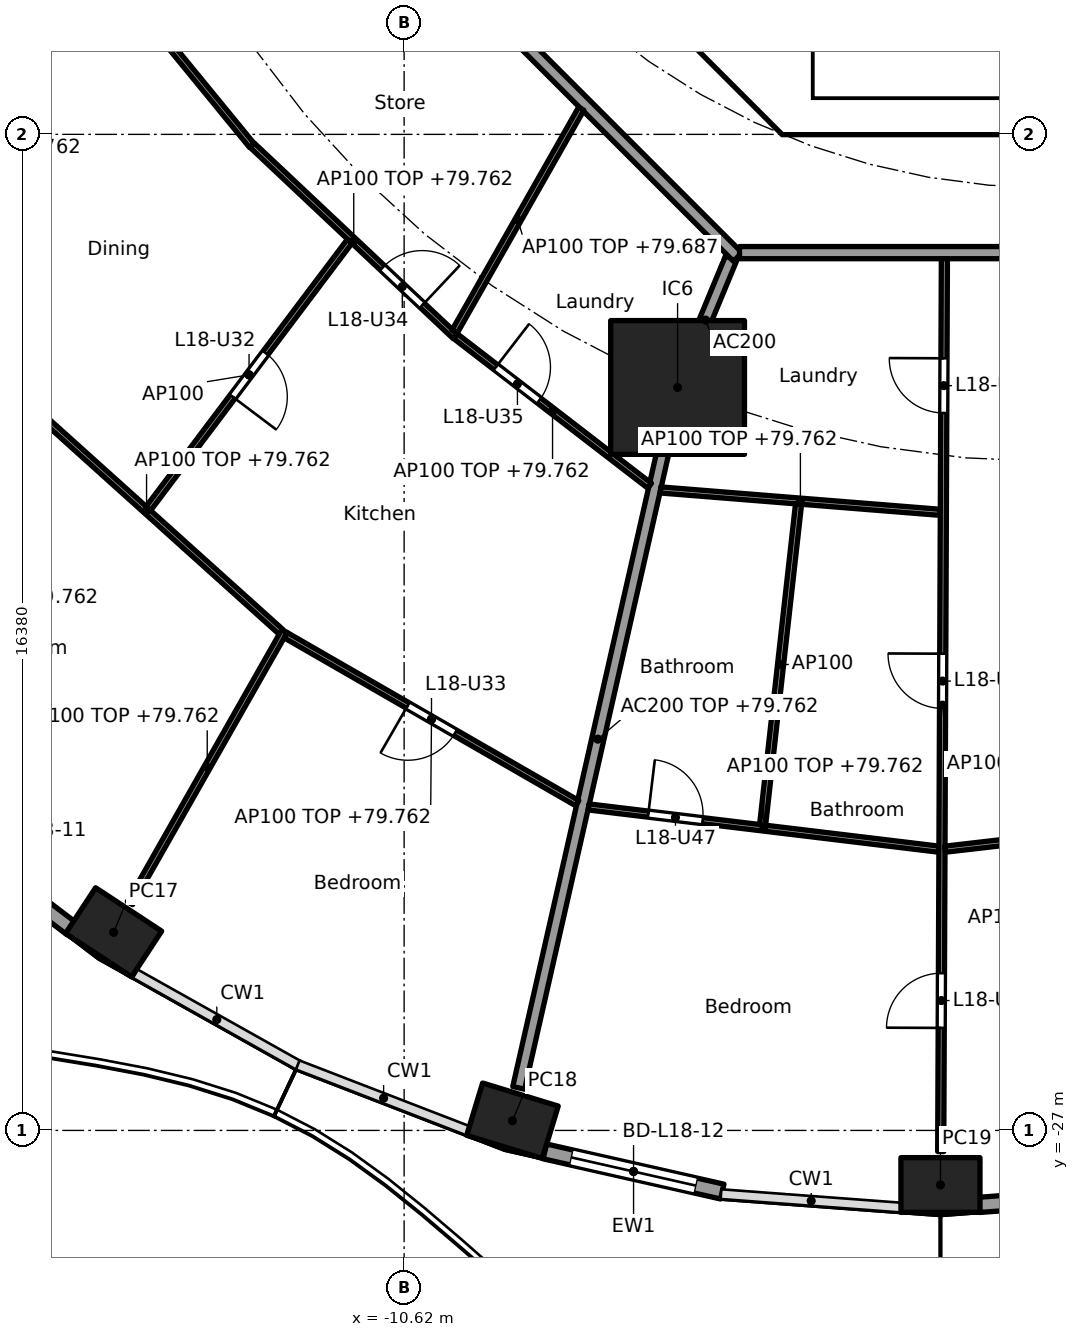
"""IFC4 building model, lengths in metres.
Left out: names, types, materials, properties, quantities, classifications, styles, units other than length and angle.
Written with IfcOpenShell. Run it as: python <this file> out.ifc"""

import sys

from ifc_helpers import new_model, si_unit, direction, frame, frame_2d, origin, origin_2d, place, context, subcontext, project, spatial, polyline, rectangle, hollow_rectangle, outline, extrude, element, fill, save


model = new_model("IFC4")
c1 = context("Model", 3, precision=1e-05, world=origin(), true_north=direction((0.0, 1.0)))
c2 = subcontext(c1, "Body", "Model", "MODEL_VIEW")
j1 = project(units=[si_unit("LENGTHUNIT", "METRE"), si_unit("PLANEANGLEUNIT", "RADIAN")], contexts=[c1])
p1 = place(None, origin())
s1 = spatial("IfcSite", under=j1, at=p1, CompositionType="ELEMENT")
p2 = place(p1, origin())
s2 = spatial("IfcBuilding", under=s1, at=p2, CompositionType="ELEMENT")
p3 = place(p2, frame((0.0, 0.0, 77.0)))
s3 = spatial("IfcBuildingStorey", under=s2, at=p3, CompositionType="ELEMENT", Elevation=77.0)
for number, where, z_axis, x_axis in (
    (1, (-15.397, -23.742, 0.0), (0.0, 0.0, 1.0), (0.836, -0.549, 0.0)),
    (2, (-8.839, -26.841, 0.0), (0.0, 0.0, 1.0), (0.957, -0.292, 0.0)),
    (3, (-1.8, -27.897, 0.0), (0.0, 0.0, 1.0), (1.0, 0.0, 0.0)),
):
    element("IfcColumn", number, at=place(p3, frame(where, z_axis=z_axis, x_axis=x_axis)), inside=s3, PredefinedType="COLUMN", context=c2, shape_type="SweptSolid", body=[
        extrude(hollow_rectangle(XDim=1.3, YDim=0.9, WallThickness=0.045, at=origin_2d()), origin(), (0.0, 0.0, 1.0), 3.7),
    ])
p4 = place(p3, frame((-6.123, -14.782, 0.0), z_axis=(0.0, 0.0, 1.0), x_axis=(1.0, 0.0, 0.0)))
e4 = element("IfcColumn", 4, at=p4, inside=s3, PredefinedType="COLUMN", context=c2, shape_type="SweptSolid", body=[
    extrude(rectangle(XDim=2.2, YDim=2.2, at=origin_2d()), origin(), (0.0, 0.0, 1.0), 3.7),
])
p5 = place(p3, frame((-16.089, -23.682, 0.0), z_axis=(0.0, 0.0, 1.0), x_axis=(-0.796037575978, 0.605247203736, 0.0)))
e5 = element("IfcWall", 5, at=p5, inside=s3, PredefinedType="SOLIDWALL", context=c2, shape_type="SweptSolid", body=[
    extrude(rectangle(XDim=3.134, YDim=0.25, at=frame_2d((1.567, 0.0))), origin(), (0.0, 0.0, 1.0), 3.44),
])
p6 = place(p5, frame((0.517, 0.0, 0.0)))
e6 = element("IfcOpeningElement", 6, at=p6, cuts=e5, PredefinedType="OPENING", context=c2, shape_type="SweptSolid", body=[
    extrude(rectangle(XDim=2.1, YDim=2.4, at=frame_2d((1.05, 1.2))), frame((0.0, 0.135, 0.0), z_axis=(0.0, -1.0, 0.0), x_axis=(1.0, 0.0, 0.0)), (0.0, 0.0, 1.0), 0.27),
])
p7 = place(p3, frame((-5.387, -28.006, 0.0), z_axis=(0.0, 0.0, 1.0), x_axis=(-0.975317607872, 0.220806620767, 0.0)))
e7 = element("IfcWall", 7, at=p7, inside=s3, PredefinedType="SOLIDWALL", context=c2, shape_type="SweptSolid", body=[
    extrude(rectangle(XDim=2.993, YDim=0.25, at=frame_2d((1.497, 0.0))), origin(), (0.0, 0.0, 1.0), 3.44),
])
p8 = place(p7, frame((0.447, 0.0, 0.0)))
e8 = element("IfcOpeningElement", 8, at=p8, cuts=e7, PredefinedType="OPENING", context=c2, shape_type="SweptSolid", body=[
    extrude(rectangle(XDim=2.1, YDim=2.4, at=frame_2d((1.05, 1.2))), frame((0.0, 0.135, 0.0), z_axis=(0.0, -1.0, 0.0), x_axis=(1.0, 0.0, 0.0)), (0.0, 0.0, 1.0), 0.27),
])
p9 = place(p3, frame((1.806, -28.003, 0.0), z_axis=(0.0, 0.0, 1.0), x_axis=(-0.997226174467, -0.074430887117, 0.0)))
e9 = element("IfcWall", 9, at=p9, inside=s3, PredefinedType="SOLIDWALL", context=c2, shape_type="SweptSolid", body=[
    extrude(rectangle(XDim=2.975, YDim=0.25, at=frame_2d((1.488, 0.0))), origin(), (0.0, 0.0, 1.0), 3.44),
])
p10 = place(p9, frame((0.438, 0.0, 0.0)))
e10 = element("IfcOpeningElement", 10, at=p10, cuts=e9, PredefinedType="OPENING", context=c2, shape_type="SweptSolid", body=[
    extrude(rectangle(XDim=2.1, YDim=2.4, at=frame_2d((1.05, 1.2))), frame((0.0, 0.135, 0.0), z_axis=(0.0, -1.0, 0.0), x_axis=(1.0, 0.0, 0.0)), (0.0, 0.0, 1.0), 0.27),
])
p11 = place(p3, frame((-9.988, -4.613, 0.0), z_axis=(0.0, 0.0, 1.0), x_axis=(0.707106781187, -0.707106781187, 0.0)))
e11 = element("IfcWall", 11, at=p11, inside=s3, PredefinedType="SHEAR", context=c2, shape_type="SweptSolid", body=[
    extrude(rectangle(XDim=7.602, YDim=0.6, at=frame_2d((3.801, 0.0))), origin(), (0.0, 0.0, 1.0), 3.44),
])
p12 = place(p11, frame((6.151, 0.0, 0.0)))
e12 = element("IfcOpeningElement", 12, at=p12, cuts=e11, PredefinedType="OPENING", context=c2, shape_type="SweptSolid", body=[
    extrude(rectangle(XDim=1.1, YDim=2.1, at=frame_2d((0.55, 1.05))), frame((0.0, 0.31, 0.0), z_axis=(0.0, -1.0, 0.0), x_axis=(1.0, 0.0, 0.0)), (0.0, 0.0, 1.0), 0.62),
])
p13 = place(p3, origin())
e13 = element("IfcWall", 13, at=p13, inside=s3, PredefinedType="SHEAR", context=c2, shape_type="SweptSolid", body=[
    extrude(outline(polyline([(-4.152, -10.025), (4.152, -10.025), (4.401, -9.776), (4.825, -10.2), (4.401, -10.625), (-4.401, -10.625), (-4.825, -10.2), (-4.401, -9.776), (-4.152, -10.025)])), origin(), (0.0, 0.0, 1.0), 3.44),
])
p14 = place(p3, origin())
e14 = element("IfcWall", 14, at=p14, inside=s3, PredefinedType="SOLIDWALL", context=c2, shape_type="SweptSolid", body=[
    extrude(outline(polyline([(-3.9, -10.025), (-4.1, -10.025), (-4.1, -7.025), (-3.9, -7.025), (-3.9, -10.025)])), origin(), (0.0, 0.0, 1.0), 3.44),
])
p15 = place(p3, frame((-5.243, -12.657, 0.0), z_axis=(0.0, 0.0, 1.0), x_axis=(-0.382668627144, -0.923885664896, 0.0)))
e15 = element("IfcWall", 15, at=p15, inside=s3, PredefinedType="PARTITIONING", context=c2, shape_type="SweptSolid", body=[
    extrude(rectangle(XDim=2.2, YDim=0.2, at=frame_2d((1.1, 0.0))), origin(), (0.0, 0.0, 1.0), 3.44),
])
p16 = place(p3, frame((-6.134, -14.831, 0.0), z_axis=(0.0, 0.0, 1.0), x_axis=(-0.221225405869, -0.975222702667, 0.0)))
e16 = element("IfcWall", 16, at=p16, inside=s3, PredefinedType="PARTITIONING", context=c2, shape_type="SweptSolid", body=[
    extrude(rectangle(XDim=11.761, YDim=0.2, at=frame_2d((5.88, 0.0))), origin(), (0.0, 0.0, 1.0), 2.762),
])
p17 = place(p3, frame((-12.635, -5.134, 0.0), z_axis=(0.0, 0.0, 1.0), x_axis=(0.707106781187, -0.707106781187, 0.0)))
e17 = element("IfcWall", 17, at=p17, inside=s3, PredefinedType="PARTITIONING", context=c2, shape_type="SweptSolid", body=[
    extrude(rectangle(XDim=10.609, YDim=0.2, at=frame_2d((5.305, 0.0))), origin(), (0.0, 0.0, 1.0), 3.44),
])
p18 = place(p3, frame((-5.104, -12.565, 0.0), z_axis=(0.0, 0.0, 1.0), x_axis=(1.0, 0.0, 0.0)))
e18 = element("IfcWall", 18, at=p18, inside=s3, PredefinedType="PARTITIONING", context=c2, shape_type="SweptSolid", body=[
    extrude(rectangle(XDim=10.409, YDim=0.2, at=frame_2d((5.205, 0.0))), origin(), (0.0, 0.0, 1.0), 3.44),
])
p19 = place(p18, frame((4.604, 0.0, 0.0)))
e19 = element("IfcOpeningElement", 19, at=p19, cuts=e18, PredefinedType="OPENING", context=c2, shape_type="SweptSolid", body=[
    extrude(rectangle(XDim=1.0, YDim=2.1, at=frame_2d((0.5, 1.05))), frame((0.0, 0.11, 0.0), z_axis=(0.0, -1.0, 0.0), x_axis=(1.0, 0.0, 0.0)), (0.0, 0.0, 1.0), 0.22),
])
p20 = place(p3, frame((-16.277, -6.951, 0.0), z_axis=(0.0, 0.0, 1.0), x_axis=(0.633427340372, -0.773802173988, 0.0)))
e20 = element("IfcWall", 20, at=p20, inside=s3, PredefinedType="PARTITIONING", context=c2, shape_type="SweptSolid", body=[
    extrude(rectangle(XDim=4.979, YDim=0.1, at=frame_2d((2.49, 0.0))), origin(), (0.0, 0.0, 1.0), 2.762),
])
p21 = place(p3, frame((-13.118, -10.8, 0.0), z_axis=(0.0, 0.0, 1.0), x_axis=(0.72818280142, -0.685382964273, 0.0)))
e21 = element("IfcWall", 21, at=p21, inside=s3, PredefinedType="PARTITIONING", context=c2, shape_type="SweptSolid", body=[
    extrude(rectangle(XDim=4.586, YDim=0.1, at=frame_2d((2.293, 0.0))), origin(), (0.0, 0.0, 1.0), 2.762),
])
p22 = place(p21, frame((2.94, 0.0, 0.0)))
e22 = element("IfcOpeningElement", 22, at=p22, cuts=e21, PredefinedType="OPENING", context=c2, shape_type="SweptSolid", body=[
    extrude(rectangle(XDim=0.9, YDim=2.1, at=frame_2d((0.45, 1.05))), frame((0.0, 0.06, 0.0), z_axis=(0.0, -1.0, 0.0), x_axis=(1.0, 0.0, 0.0)), (0.0, 0.0, 1.0), 0.12),
])
p23 = place(p3, frame((-17.063, -14.827, 0.0), z_axis=(0.0, 0.0, 1.0), x_axis=(0.743478142868, -0.668760234373, 0.0)))
e23 = element("IfcWall", 23, at=p23, inside=s3, PredefinedType="PARTITIONING", context=c2, shape_type="SweptSolid", body=[
    extrude(rectangle(XDim=5.937, YDim=0.1, at=frame_2d((2.969, 0.0))), origin(), (0.0, 0.0, 1.0), 2.762),
])
p24 = place(p3, frame((-11.515, -12.377, 0.0), z_axis=(0.0, 0.0, 1.0), x_axis=(-0.60163860397, -0.798768420891, 0.0)))
e24 = element("IfcWall", 24, at=p24, inside=s3, PredefinedType="PARTITIONING", context=c2, shape_type="SweptSolid", body=[
    extrude(rectangle(XDim=5.502, YDim=0.1, at=frame_2d((2.751, 0.0))), origin(), (0.0, 0.0, 1.0), 3.44),
])
p25 = place(p24, frame((2.301, 0.0, 0.0)))
e25 = element("IfcOpeningElement", 25, at=p25, cuts=e24, PredefinedType="OPENING", context=c2, shape_type="SweptSolid", body=[
    extrude(rectangle(XDim=0.9, YDim=2.1, at=frame_2d((0.45, 1.05))), frame((0.0, 0.06, 0.0), z_axis=(0.0, -1.0, 0.0), x_axis=(1.0, 0.0, 0.0)), (0.0, 0.0, 1.0), 0.12),
])
p26 = place(p3, frame((-7.707, -10.198, 0.0), z_axis=(0.0, 0.0, 1.0), x_axis=(-0.493986531217, -0.869469554945, 0.0)))
e26 = element("IfcWall", 26, at=p26, inside=s3, PredefinedType="PARTITIONING", context=c2, shape_type="SweptSolid", body=[
    extrude(rectangle(XDim=4.217, YDim=0.1, at=frame_2d((2.109, 0.0))), origin(), (0.0, 0.0, 1.0), 2.687),
])
p27 = place(p3, frame((-9.775, -13.939, 0.0), z_axis=(0.0, 0.0, 1.0), x_axis=(0.792162117554, -0.610310723741, 0.0)))
e27 = element("IfcWall", 27, at=p27, inside=s3, PredefinedType="PARTITIONING", context=c2, shape_type="SweptSolid", body=[
    extrude(rectangle(XDim=4.03, YDim=0.1, at=frame_2d((2.015, 0.0))), origin(), (0.0, 0.0, 1.0), 2.762),
])
p28 = place(p27, frame((0.836, 0.0, 0.0)))
e28 = element("IfcOpeningElement", 28, at=p28, cuts=e27, PredefinedType="OPENING", context=c2, shape_type="SweptSolid", body=[
    extrude(rectangle(XDim=0.9, YDim=2.1, at=frame_2d((0.45, 1.05))), frame((0.0, 0.06, 0.0), z_axis=(0.0, -1.0, 0.0), x_axis=(1.0, 0.0, 0.0)), (0.0, 0.0, 1.0), 0.12),
])
p29 = place(p3, frame((-12.587, -18.787, 0.0), z_axis=(0.0, 0.0, 1.0), x_axis=(-0.493966211317, -0.869481099321, 0.0)))
e29 = element("IfcWall", 29, at=p29, inside=s3, PredefinedType="PARTITIONING", context=c2, shape_type="SweptSolid", body=[
    extrude(rectangle(XDim=5.146, YDim=0.1, at=frame_2d((2.573, 0.0))), origin(), (0.0, 0.0, 1.0), 2.762),
])
p30 = place(p3, frame((-12.568, -18.856, 0.0), z_axis=(0.0, 0.0, 1.0), x_axis=(0.866533437451, -0.499119025664, 0.0)))
e30 = element("IfcWall", 30, at=p30, inside=s3, PredefinedType="PARTITIONING", context=c2, shape_type="SweptSolid", body=[
    extrude(rectangle(XDim=5.535, YDim=0.1, at=frame_2d((2.768, 0.0))), origin(), (0.0, 0.0, 1.0), 2.762),
])
p31 = place(p30, frame((2.317, 0.0, 0.0)))
e31 = element("IfcOpeningElement", 31, at=p31, cuts=e30, PredefinedType="OPENING", context=c2, shape_type="SweptSolid", body=[
    extrude(rectangle(XDim=0.9, YDim=2.1, at=frame_2d((0.45, 1.05))), frame((0.0, 0.06, 0.0), z_axis=(0.0, -1.0, 0.0), x_axis=(1.0, 0.0, 0.0)), (0.0, 0.0, 1.0), 0.12),
])
p32 = place(p3, frame((-6.404, -16.468, 0.0), z_axis=(0.0, 0.0, 1.0), x_axis=(0.996818808981, -0.079701079432, 0.0)))
e32 = element("IfcWall", 32, at=p32, inside=s3, PredefinedType="PARTITIONING", context=c2, shape_type="SweptSolid", body=[
    extrude(rectangle(XDim=4.616, YDim=0.1, at=frame_2d((2.308, 0.0))), origin(), (0.0, 0.0, 1.0), 2.762),
])
p33 = place(p3, frame((-7.586, -21.68, 0.0), z_axis=(0.0, 0.0, 1.0), x_axis=(0.992810189026, -0.119699325668, 0.0)))
e33 = element("IfcWall", 33, at=p33, inside=s3, PredefinedType="PARTITIONING", context=c2, shape_type="SweptSolid", body=[
    extrude(rectangle(XDim=5.803, YDim=0.1, at=frame_2d((2.901, 0.0))), origin(), (0.0, 0.0, 1.0), 2.762),
])
p34 = place(p33, frame((0.988, 0.0, 0.0)))
e34 = element("IfcOpeningElement", 34, at=p34, cuts=e33, PredefinedType="OPENING", context=c2, shape_type="SweptSolid", body=[
    extrude(rectangle(XDim=0.9, YDim=2.1, at=frame_2d((0.45, 1.05))), frame((0.0, 0.06, 0.0), z_axis=(0.0, -1.0, 0.0), x_axis=(1.0, 0.0, 0.0)), (0.0, 0.0, 1.0), 0.12),
])
p35 = place(p3, frame((-4.134, -16.699, 0.0), z_axis=(0.0, 0.0, 1.0), x_axis=(-0.111340048649, -0.993782367305, 0.0)))
e35 = element("IfcWall", 35, at=p35, inside=s3, PredefinedType="PARTITIONING", context=c2, shape_type="SweptSolid", body=[
    extrude(rectangle(XDim=5.309, YDim=0.1, at=frame_2d((2.654, 0.0))), origin(), (0.0, 0.0, 1.0), 3.44),
])
p36 = place(p3, frame((-1.735, -12.665, 0.0), z_axis=(0.0, 0.0, 1.0), x_axis=(-0.004107048833, -0.999991566039, 0.0)))
e36 = element("IfcWall", 36, at=p36, inside=s3, PredefinedType="PARTITIONING", context=c2, shape_type="SweptSolid", body=[
    extrude(rectangle(XDim=14.683, YDim=0.1, at=frame_2d((7.341, 0.0))), origin(), (0.0, 0.0, 1.0), 2.687),
])
p37 = place(p36, frame((1.637, 0.0, 0.0)))
e37 = element("IfcOpeningElement", 37, at=p37, cuts=e36, PredefinedType="OPENING", context=c2, shape_type="SweptSolid", body=[
    extrude(rectangle(XDim=0.9, YDim=2.1, at=frame_2d((0.45, 1.05))), frame((0.0, 0.06, 0.0), z_axis=(0.0, -1.0, 0.0), x_axis=(1.0, 0.0, 0.0)), (0.0, 0.0, 1.0), 0.12),
])
p38 = place(p36, frame((6.496, 0.0, 0.0)))
e38 = element("IfcOpeningElement", 38, at=p38, cuts=e36, PredefinedType="OPENING", context=c2, shape_type="SweptSolid", body=[
    extrude(rectangle(XDim=0.9, YDim=2.1, at=frame_2d((0.45, 1.05))), frame((0.0, 0.06, 0.0), z_axis=(0.0, -1.0, 0.0), x_axis=(1.0, 0.0, 0.0)), (0.0, 0.0, 1.0), 0.12),
])
p39 = place(p36, frame((11.75, 0.0, 0.0)))
e39 = element("IfcOpeningElement", 39, at=p39, cuts=e36, PredefinedType="OPENING", context=c2, shape_type="SweptSolid", body=[
    extrude(rectangle(XDim=0.9, YDim=2.1, at=frame_2d((0.45, 1.05))), frame((0.0, 0.06, 0.0), z_axis=(0.0, -1.0, 0.0), x_axis=(1.0, 0.0, 0.0)), (0.0, 0.0, 1.0), 0.12),
])
p40 = place(p3, frame((-1.726, -22.375, 0.0), z_axis=(0.0, 0.0, 1.0), x_axis=(0.99339223329, 0.114768771187, 0.0)))
e40 = element("IfcWall", 40, at=p40, inside=s3, PredefinedType="PARTITIONING", context=c2, shape_type="SweptSolid", body=[
    extrude(rectangle(XDim=5.701, YDim=0.1, at=frame_2d((2.851, 0.0))), origin(), (0.0, 0.0, 1.0), 2.762),
])
p41 = place(p40, frame((2.4, 0.0, 0.0)))
e41 = element("IfcOpeningElement", 41, at=p41, cuts=e40, PredefinedType="OPENING", context=c2, shape_type="SweptSolid", body=[
    extrude(rectangle(XDim=0.9, YDim=2.1, at=frame_2d((0.45, 1.05))), frame((0.0, 0.06, 0.0), z_axis=(0.0, -1.0, 0.0), x_axis=(1.0, 0.0, 0.0)), (0.0, 0.0, 1.0), 0.12),
])
p42 = place(p8, origin())
e42 = element("IfcDoor", 42, at=p42, inside=s3, OperationType="SLIDING_TO_LEFT", PredefinedType="DOOR", context=c2, shape_type="SweptSolid", body=[
    extrude(rectangle(XDim=2.1, YDim=2.4, at=frame_2d((1.05, 1.2))), frame((0.0, 0.025, 0.0), z_axis=(0.0, -1.0, 0.0), x_axis=(1.0, 0.0, 0.0)), (0.0, 0.0, 1.0), 0.05),
])
fill(e8, e42)
p43 = place(p12, origin())
e43 = element("IfcDoor", 43, at=p43, inside=s3, OperationType="SINGLE_SWING_LEFT", PredefinedType="DOOR", context=c2, shape_type="SweptSolid", body=[
    extrude(rectangle(XDim=1.1, YDim=2.1, at=frame_2d((0.55, 1.05))), frame((0.0, 0.025, 0.0), z_axis=(0.0, -1.0, 0.0), x_axis=(1.0, 0.0, 0.0)), (0.0, 0.0, 1.0), 0.05),
])
fill(e12, e43)
p44 = place(p25, origin())
e44 = element("IfcDoor", 44, at=p44, inside=s3, OperationType="SINGLE_SWING_RIGHT", PredefinedType="DOOR", context=c2, shape_type="SweptSolid", body=[
    extrude(rectangle(XDim=0.9, YDim=2.1, at=frame_2d((0.45, 1.05))), frame((0.0, 0.025, 0.0), z_axis=(0.0, -1.0, 0.0), x_axis=(1.0, 0.0, 0.0)), (0.0, 0.0, 1.0), 0.05),
])
fill(e25, e44)
p45 = place(p31, frame((0.9, 0.0, 0.0), x_axis=(-1.0, 0.0, 0.0)))
e45 = element("IfcDoor", 45, at=p45, inside=s3, OperationType="SINGLE_SWING_RIGHT", PredefinedType="DOOR", context=c2, shape_type="SweptSolid", body=[
    extrude(rectangle(XDim=0.9, YDim=2.1, at=frame_2d((0.45, 1.05))), frame((0.0, 0.025, 0.0), z_axis=(0.0, -1.0, 0.0), x_axis=(1.0, 0.0, 0.0)), (0.0, 0.0, 1.0), 0.05),
])
fill(e31, e45)
p46 = place(p22, origin())
e46 = element("IfcDoor", 46, at=p46, inside=s3, OperationType="SINGLE_SWING_RIGHT", PredefinedType="DOOR", context=c2, shape_type="SweptSolid", body=[
    extrude(rectangle(XDim=0.9, YDim=2.1, at=frame_2d((0.45, 1.05))), frame((0.0, 0.025, 0.0), z_axis=(0.0, -1.0, 0.0), x_axis=(1.0, 0.0, 0.0)), (0.0, 0.0, 1.0), 0.05),
])
fill(e22, e46)
p47 = place(p28, origin())
e47 = element("IfcDoor", 47, at=p47, inside=s3, OperationType="SINGLE_SWING_LEFT", PredefinedType="DOOR", context=c2, shape_type="SweptSolid", body=[
    extrude(rectangle(XDim=0.9, YDim=2.1, at=frame_2d((0.45, 1.05))), frame((0.0, 0.025, 0.0), z_axis=(0.0, -1.0, 0.0), x_axis=(1.0, 0.0, 0.0)), (0.0, 0.0, 1.0), 0.05),
])
fill(e28, e47)
p48 = place(p37, frame((0.9, 0.0, 0.0), x_axis=(-1.0, 0.0, 0.0)))
e48 = element("IfcDoor", 48, at=p48, inside=s3, OperationType="SINGLE_SWING_RIGHT", PredefinedType="DOOR", context=c2, shape_type="SweptSolid", body=[
    extrude(rectangle(XDim=0.9, YDim=2.1, at=frame_2d((0.45, 1.05))), frame((0.0, 0.025, 0.0), z_axis=(0.0, -1.0, 0.0), x_axis=(1.0, 0.0, 0.0)), (0.0, 0.0, 1.0), 0.05),
])
fill(e37, e48)
p49 = place(p38, frame((0.9, 0.0, 0.0), x_axis=(-1.0, 0.0, 0.0)))
e49 = element("IfcDoor", 49, at=p49, inside=s3, OperationType="SINGLE_SWING_RIGHT", PredefinedType="DOOR", context=c2, shape_type="SweptSolid", body=[
    extrude(rectangle(XDim=0.9, YDim=2.1, at=frame_2d((0.45, 1.05))), frame((0.0, 0.025, 0.0), z_axis=(0.0, -1.0, 0.0), x_axis=(1.0, 0.0, 0.0)), (0.0, 0.0, 1.0), 0.05),
])
fill(e38, e49)
p50 = place(p39, frame((0.9, 0.0, 0.0), x_axis=(-1.0, 0.0, 0.0)))
e50 = element("IfcDoor", 50, at=p50, inside=s3, OperationType="SINGLE_SWING_LEFT", PredefinedType="DOOR", context=c2, shape_type="SweptSolid", body=[
    extrude(rectangle(XDim=0.9, YDim=2.1, at=frame_2d((0.45, 1.05))), frame((0.0, 0.025, 0.0), z_axis=(0.0, -1.0, 0.0), x_axis=(1.0, 0.0, 0.0)), (0.0, 0.0, 1.0), 0.05),
])
fill(e39, e50)
p51 = place(p34, origin())
e51 = element("IfcDoor", 51, at=p51, inside=s3, OperationType="SINGLE_SWING_LEFT", PredefinedType="DOOR", context=c2, shape_type="SweptSolid", body=[
    extrude(rectangle(XDim=0.9, YDim=2.1, at=frame_2d((0.45, 1.05))), frame((0.0, 0.025, 0.0), z_axis=(0.0, -1.0, 0.0), x_axis=(1.0, 0.0, 0.0)), (0.0, 0.0, 1.0), 0.05),
])
fill(e34, e51)
save(model, sys.argv[1])
